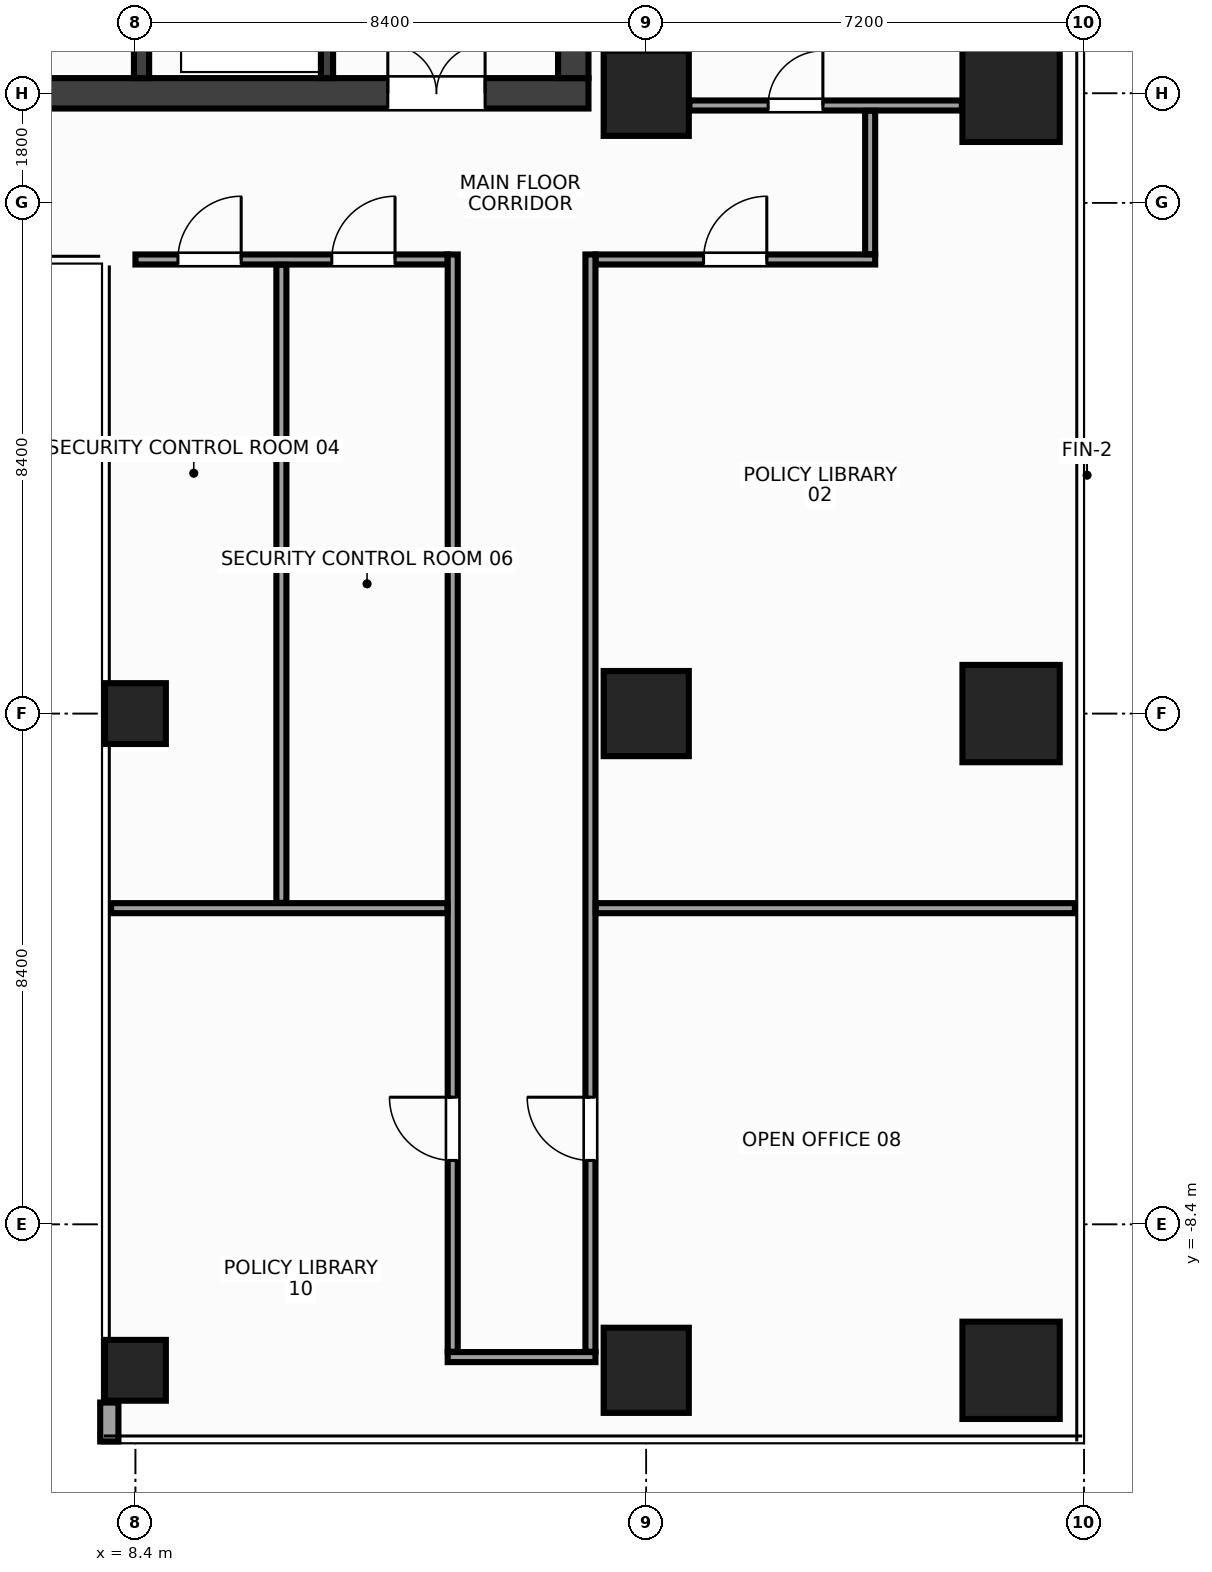
"""IFC4 building model, lengths in metres.
Left out: names, types, materials, properties, quantities, classifications, styles, units other than length and angle.
Written with IfcOpenShell. Run it as: python <this file> out.ifc"""

import sys

from ifc_helpers import new_model, si_unit, direction, frame, frame_2d, origin, origin_2d, place, context, subcontext, project, spatial, rectangle, hollow_rectangle, extrude, source, transform, mapped, element, fill, save


model = new_model("IFC4")
c1 = context("Model", 3, precision=1e-05, world=origin(), true_north=direction((0.0, 1.0)))
c2 = subcontext(c1, "Body", "Model", "MODEL_VIEW")
j1 = project(units=[si_unit("LENGTHUNIT", "METRE"), si_unit("PLANEANGLEUNIT", "RADIAN")], contexts=[c1])
p1 = place(None, origin())
s1 = spatial("IfcSite", under=j1, at=p1, CompositionType="ELEMENT")
p2 = place(p1, origin())
s2 = spatial("IfcBuilding", under=s1, at=p2, CompositionType="ELEMENT")
p3 = place(p2, frame((0.0, 0.0, 218.0)))
s3 = spatial("IfcBuildingStorey", under=s2, at=p3, CompositionType="ELEMENT", Elevation=218.0)
m1 = source(origin(), c2, "Body", "SweptSolid", [
    extrude(rectangle(XDim=31.7, YDim=0.5, at=frame_2d((15.85, 0.0))), origin(), (0.0, 0.0, 1.0), 3.6),
])
p4 = place(p3, frame((-15.85, 10.2, 0.0), z_axis=(0.0, 0.0, 1.0), x_axis=(1.0, 0.0, 0.0)))
e1 = element("IfcWall", 1, at=p4, inside=s3, PredefinedType="SHEAR", context=c2, shape_type="MappedRepresentation", body=[
    mapped(m1, transform((0.0, 0.0, 0.0), x_axis=(1.0, 0.0, 0.0), y_axis=(0.0, 1.0, 0.0), z_axis=(0.0, 0.0, 1.0), scale=1.0)),
])
p5 = place(p4, frame((1.7, 0.0, 0.0)))
e2 = element("IfcOpeningElement", 2, at=p5, cuts=e1, PredefinedType="OPENING", context=c2, shape_type="SweptSolid", body=[
    extrude(rectangle(XDim=1.6, YDim=2.15, at=frame_2d((0.8, 1.075))), frame((0.0, 0.262, 0.0), z_axis=(0.0, -1.0, 0.0), x_axis=(1.0, 0.0, 0.0)), (0.0, 0.0, 1.0), 0.524),
])
p6 = place(p4, frame((28.4, 0.0, 0.0)))
e3 = element("IfcOpeningElement", 3, at=p6, cuts=e1, PredefinedType="OPENING", context=c2, shape_type="SweptSolid", body=[
    extrude(rectangle(XDim=1.6, YDim=2.15, at=frame_2d((0.8, 1.075))), frame((0.0, 0.262, 0.0), z_axis=(0.0, -1.0, 0.0), x_axis=(1.0, 0.0, 0.0)), (0.0, 0.0, 1.0), 0.524),
])
p7 = place(p4, frame((15.1, 0.0, 0.0)))
e4 = element("IfcOpeningElement", 4, at=p7, cuts=e1, PredefinedType="OPENING", context=c2, shape_type="SweptSolid", body=[
    extrude(rectangle(XDim=1.5, YDim=2.2, at=frame_2d((0.75, 1.1))), frame((0.0, 0.262, 0.0), z_axis=(0.0, -1.0, 0.0), x_axis=(1.0, 0.0, 0.0)), (0.0, 0.0, 1.0), 0.524),
])
m2 = source(origin(), c2, "Body", "SweptSolid", [
    extrude(rectangle(XDim=13.1, YDim=0.5, at=frame_2d((6.55, 0.0))), origin(), (0.0, 0.0, 1.0), 3.6),
])
p8 = place(p3, frame((15.6, 10.45, 0.0), z_axis=(0.0, 0.0, 1.0), x_axis=(0.0, 1.0, 0.0)))
e5 = element("IfcWall", 5, at=p8, inside=s3, PredefinedType="SHEAR", context=c2, shape_type="MappedRepresentation", body=[
    mapped(m2, transform((0.0, 0.0, 0.0), x_axis=(1.0, 0.0, 0.0), y_axis=(0.0, 1.0, 0.0), z_axis=(0.0, 0.0, 1.0), scale=1.0)),
])
m3 = source(origin(), c2, "Body", "SweptSolid", [
    extrude(rectangle(XDim=13.1, YDim=0.25, at=frame_2d((6.55, 0.0))), origin(), (0.0, 0.0, 1.0), 3.6),
])
p9 = place(p3, frame((8.5, 10.45, 0.0), z_axis=(0.0, 0.0, 1.0), x_axis=(0.0, 1.0, 0.0)))
e6 = element("IfcWall", 6, at=p9, inside=s3, PredefinedType="SHEAR", context=c2, shape_type="MappedRepresentation", body=[
    mapped(m3, transform((0.0, 0.0, 0.0), x_axis=(1.0, 0.0, 0.0), y_axis=(0.0, 1.0, 0.0), z_axis=(0.0, 0.0, 1.0), scale=1.0)),
])
p10 = place(p9, frame((10.0, 0.0, 0.0)))
e7 = element("IfcOpeningElement", 7, at=p10, cuts=e6, PredefinedType="OPENING", context=c2, shape_type="SweptSolid", body=[
    extrude(rectangle(XDim=0.95, YDim=2.15, at=frame_2d((0.475, 1.075))), frame((0.0, 0.137, 0.0), z_axis=(0.0, -1.0, 0.0), x_axis=(1.0, 0.0, 0.0)), (0.0, 0.0, 1.0), 0.274),
])
m4 = source(origin(), c2, "Body", "SweptSolid", [
    extrude(rectangle(XDim=3.2, YDim=0.2, at=frame_2d((1.6, 0.0))), origin(), (0.0, 0.0, 1.0), 3.6),
])
p11 = place(p3, frame((11.55, 10.45, 0.0), z_axis=(0.0, 0.0, 1.0), x_axis=(0.0, 1.0, 0.0)))
e8 = element("IfcWall", 8, at=p11, inside=s3, PredefinedType="SHEAR", context=c2, shape_type="MappedRepresentation", body=[
    mapped(m4, transform((0.0, 0.0, 0.0), x_axis=(1.0, 0.0, 0.0), y_axis=(0.0, 1.0, 0.0), z_axis=(0.0, 0.0, 1.0), scale=1.0)),
])
p12 = place(p11, frame((0.9, 0.0, 0.0)))
e9 = element("IfcOpeningElement", 9, at=p12, cuts=e8, PredefinedType="OPENING", context=c2, shape_type="SweptSolid", body=[
    extrude(rectangle(XDim=1.1, YDim=2.15, at=frame_2d((0.55, 1.075))), frame((0.0, 0.112, 0.0), z_axis=(0.0, -1.0, 0.0), x_axis=(1.0, 0.0, 0.0)), (0.0, 0.0, 1.0), 0.224),
])
m5 = source(origin(), c2, "Body", "SweptSolid", [
    extrude(rectangle(XDim=1.4, YDim=1.4, at=origin_2d()), origin(), (0.0, 0.0, 1.0), 3.6),
])
for number, where, z_axis, x_axis in (
    (10, (16.8, -10.8, 0.0), (0.0, 0.0, 1.0), (1.0, 0.0, 0.0)),
    (11, (16.8, 0.0, 0.0), (0.0, 0.0, 1.0), (1.0, 0.0, 0.0)),
    (12, (16.8, 10.2, 0.0), (0.0, 0.0, 1.0), (1.0, 0.0, 0.0)),
):
    element("IfcColumn", number, at=place(p3, frame(where, z_axis=z_axis, x_axis=x_axis)), inside=s3, PredefinedType="COLUMN", context=c2, shape_type="MappedRepresentation", body=[
        mapped(m5, transform((0.0, 0.0, 0.0), x_axis=(1.0, 0.0, 0.0), y_axis=(0.0, 1.0, 0.0), z_axis=(0.0, 0.0, 1.0), scale=1.0)),
    ])
m6 = source(origin(), c2, "Body", "SweptSolid", [
    extrude(rectangle(XDim=1.6, YDim=1.6, at=origin_2d()), origin(), (0.0, 0.0, 1.0), 3.6),
])
for number, where, z_axis, x_axis in (
    (13, (22.8, -10.8, 0.0), (0.0, 0.0, 1.0), (1.0, 0.0, 0.0)),
    (14, (22.8, 0.0, 0.0), (0.0, 0.0, 1.0), (1.0, 0.0, 0.0)),
    (15, (22.8, 10.2, 0.0), (0.0, 0.0, 1.0), (1.0, 0.0, 0.0)),
):
    element("IfcColumn", number, at=place(p3, frame(where, z_axis=z_axis, x_axis=x_axis)), inside=s3, PredefinedType="COLUMN", context=c2, shape_type="MappedRepresentation", body=[
        mapped(m6, transform((0.0, 0.0, 0.0), x_axis=(1.0, 0.0, 0.0), y_axis=(0.0, 1.0, 0.0), z_axis=(0.0, 0.0, 1.0), scale=1.0)),
    ])
m7 = source(origin(), c2, "Body", "SweptSolid", [
    extrude(hollow_rectangle(XDim=1.0, YDim=1.0, WallThickness=0.045, at=origin_2d()), origin(), (0.0, 0.0, 1.0), 3.6),
])
for number, where, z_axis, x_axis in (
    (16, (8.4, 0.0, 0.0), (0.0, 0.0, 1.0), (1.0, 0.0, 0.0)),
    (17, (8.4, -10.8, 0.0), (0.0, 0.0, 1.0), (1.0, 0.0, 0.0)),
):
    element("IfcColumn", number, at=place(p3, frame(where, z_axis=z_axis, x_axis=x_axis)), inside=s3, PredefinedType="COLUMN", context=c2, shape_type="MappedRepresentation", body=[
        mapped(m7, transform((0.0, 0.0, 0.0), x_axis=(1.0, 0.0, 0.0), y_axis=(0.0, 1.0, 0.0), z_axis=(0.0, 0.0, 1.0), scale=1.0)),
    ])
m8 = source(origin(), c2, "Body", "SweptSolid", [
    extrude(rectangle(XDim=0.64, YDim=0.24, at=frame_2d((0.32, 0.0))), origin(), (0.0, 0.0, 1.0), 2.76),
])
p13 = place(p3, frame((7.97, -11.33, 0.0), z_axis=(0.0, 0.0, 1.0), x_axis=(0.0, -1.0, 0.0)))
e18 = element("IfcWall", 18, at=p13, inside=s3, PredefinedType="STANDARD", context=c2, shape_type="MappedRepresentation", body=[
    mapped(m8, transform((0.0, 0.0, 0.0), x_axis=(1.0, 0.0, 0.0), y_axis=(0.0, 1.0, 0.0), z_axis=(0.0, 0.0, 1.0), scale=1.0)),
])
m9 = source(origin(), c2, "Body", "SweptSolid", [
    extrude(rectangle(XDim=4.48, YDim=0.165, at=frame_2d((2.24, 0.0))), origin(), (0.0, 0.0, 1.0), 2.915),
])
p14 = place(p3, frame((17.51, 10.0, 0.0), z_axis=(0.0, 0.0, 1.0), x_axis=(1.0, 0.0, 0.0)))
e19 = element("IfcWall", 19, at=p14, inside=s3, PredefinedType="PARTITIONING", context=c2, shape_type="MappedRepresentation", body=[
    mapped(m9, transform((0.0, 0.0, 0.0), x_axis=(1.0, 0.0, 0.0), y_axis=(0.0, 1.0, 0.0), z_axis=(0.0, 0.0, 1.0), scale=1.0)),
])
p15 = place(p14, frame((1.295, 0.0, 0.0)))
e20 = element("IfcOpeningElement", 20, at=p15, cuts=e19, PredefinedType="OPENING", context=c2, shape_type="SweptSolid", body=[
    extrude(rectangle(XDim=0.9, YDim=2.15, at=frame_2d((0.45, 1.075))), frame((0.0, 0.094, 0.0), z_axis=(0.0, -1.0, 0.0), x_axis=(1.0, 0.0, 0.0)), (0.0, 0.0, 1.0), 0.189),
])
m10 = source(origin(), c2, "Body", "SweptSolid", [
    extrude(rectangle(XDim=5.135, YDim=0.165, at=frame_2d((2.567, 0.0))), origin(), (0.0, 0.0, 1.0), 3.38),
])
p16 = place(p3, frame((8.4, 7.468, 0.0), z_axis=(0.0, 0.0, 1.0), x_axis=(1.0, 0.0, 0.0)))
e21 = element("IfcWall", 21, at=p16, inside=s3, PredefinedType="PARTITIONING", context=c2, shape_type="MappedRepresentation", body=[
    mapped(m10, transform((0.0, 0.0, 0.0), x_axis=(1.0, 0.0, 0.0), y_axis=(0.0, 1.0, 0.0), z_axis=(0.0, 0.0, 1.0), scale=1.0)),
])
p17 = place(p16, frame((0.699, 0.0, 0.0)))
e22 = element("IfcOpeningElement", 22, at=p17, cuts=e21, PredefinedType="OPENING", context=c2, shape_type="SweptSolid", body=[
    extrude(rectangle(XDim=1.04, YDim=2.2, at=frame_2d((0.52, 1.1))), frame((0.0, 0.094, 0.0), z_axis=(0.0, -1.0, 0.0), x_axis=(1.0, 0.0, 0.0)), (0.0, 0.0, 1.0), 0.189),
])
p18 = place(p16, frame((3.229, 0.0, 0.0)))
e23 = element("IfcOpeningElement", 23, at=p18, cuts=e21, PredefinedType="OPENING", context=c2, shape_type="SweptSolid", body=[
    extrude(rectangle(XDim=1.04, YDim=2.2, at=frame_2d((0.52, 1.1))), frame((0.0, 0.094, 0.0), z_axis=(0.0, -1.0, 0.0), x_axis=(1.0, 0.0, 0.0)), (0.0, 0.0, 1.0), 0.189),
])
m11 = source(origin(), c2, "Body", "SweptSolid", [
    extrude(rectangle(XDim=4.6, YDim=0.165, at=frame_2d((2.3, 0.0))), origin(), (0.0, 0.0, 1.0), 2.765),
])
p19 = place(p3, frame((15.965, 7.468, 0.0), z_axis=(0.0, 0.0, 1.0), x_axis=(1.0, 0.0, 0.0)))
e24 = element("IfcWall", 24, at=p19, inside=s3, PredefinedType="PARTITIONING", context=c2, shape_type="MappedRepresentation", body=[
    mapped(m11, transform((0.0, 0.0, 0.0), x_axis=(1.0, 0.0, 0.0), y_axis=(0.0, 1.0, 0.0), z_axis=(0.0, 0.0, 1.0), scale=1.0)),
])
p20 = place(p19, frame((1.778, 0.0, 0.0)))
e25 = element("IfcOpeningElement", 25, at=p20, cuts=e24, PredefinedType="OPENING", context=c2, shape_type="SweptSolid", body=[
    extrude(rectangle(XDim=1.04, YDim=2.2, at=frame_2d((0.52, 1.1))), frame((0.0, 0.094, 0.0), z_axis=(0.0, -1.0, 0.0), x_axis=(1.0, 0.0, 0.0)), (0.0, 0.0, 1.0), 0.189),
])
m12 = source(origin(), c2, "Body", "SweptSolid", [
    extrude(rectangle(XDim=2.43, YDim=0.165, at=frame_2d((1.215, 0.0))), origin(), (0.0, 0.0, 1.0), 2.915),
])
p21 = place(p3, frame((13.535, -10.583, 0.0), z_axis=(0.0, 0.0, 1.0), x_axis=(1.0, 0.0, 0.0)))
e26 = element("IfcWall", 26, at=p21, inside=s3, PredefinedType="PARTITIONING", context=c2, shape_type="MappedRepresentation", body=[
    mapped(m12, transform((0.0, 0.0, 0.0), x_axis=(1.0, 0.0, 0.0), y_axis=(0.0, 1.0, 0.0), z_axis=(0.0, 0.0, 1.0), scale=1.0)),
])
m13 = source(origin(), c2, "Body", "SweptSolid", [
    extrude(rectangle(XDim=2.358, YDim=0.165, at=frame_2d((1.179, 0.0))), origin(), (0.0, 0.0, 1.0), 3.38),
])
p22 = place(p3, frame((20.482, 7.555, 0.0), z_axis=(0.0, 0.0, 1.0), x_axis=(0.0, 1.0, 0.0)))
e27 = element("IfcWall", 27, at=p22, inside=s3, PredefinedType="PARTITIONING", context=c2, shape_type="MappedRepresentation", body=[
    mapped(m13, transform((0.0, 0.0, 0.0), x_axis=(1.0, 0.0, 0.0), y_axis=(0.0, 1.0, 0.0), z_axis=(0.0, 0.0, 1.0), scale=1.0)),
])
m14 = source(origin(), c2, "Body", "SweptSolid", [
    extrude(rectangle(XDim=18.045, YDim=0.165, at=frame_2d((9.022, 0.0))), origin(), (0.0, 0.0, 1.0), 2.915),
])
p23 = place(p3, frame((13.617, -10.495, 0.0), z_axis=(0.0, 0.0, 1.0), x_axis=(0.0, 1.0, 0.0)))
e28 = element("IfcWall", 28, at=p23, inside=s3, PredefinedType="PARTITIONING", context=c2, shape_type="MappedRepresentation", body=[
    mapped(m14, transform((0.0, 0.0, 0.0), x_axis=(1.0, 0.0, 0.0), y_axis=(0.0, 1.0, 0.0), z_axis=(0.0, 0.0, 1.0), scale=1.0)),
])
p24 = place(p23, frame((3.146, 0.0, 0.0)))
e29 = element("IfcOpeningElement", 29, at=p24, cuts=e28, PredefinedType="OPENING", context=c2, shape_type="SweptSolid", body=[
    extrude(rectangle(XDim=1.04, YDim=2.2, at=frame_2d((0.52, 1.1))), frame((0.0, 0.094, 0.0), z_axis=(0.0, -1.0, 0.0), x_axis=(1.0, 0.0, 0.0)), (0.0, 0.0, 1.0), 0.189),
])
p25 = place(p3, frame((15.883, -10.495, 0.0), z_axis=(0.0, 0.0, 1.0), x_axis=(0.0, 1.0, 0.0)))
e30 = element("IfcWall", 30, at=p25, inside=s3, PredefinedType="PARTITIONING", context=c2, shape_type="MappedRepresentation", body=[
    mapped(m14, transform((0.0, 0.0, 0.0), x_axis=(1.0, 0.0, 0.0), y_axis=(0.0, 1.0, 0.0), z_axis=(0.0, 0.0, 1.0), scale=1.0)),
])
p26 = place(p25, frame((3.146, 0.0, 0.0)))
e31 = element("IfcOpeningElement", 31, at=p26, cuts=e30, PredefinedType="OPENING", context=c2, shape_type="SweptSolid", body=[
    extrude(rectangle(XDim=1.04, YDim=2.2, at=frame_2d((0.52, 1.1))), frame((0.0, 0.094, 0.0), z_axis=(0.0, -1.0, 0.0), x_axis=(1.0, 0.0, 0.0)), (0.0, 0.0, 1.0), 0.189),
])
m15 = source(origin(), c2, "Body", "SweptSolid", [
    extrude(rectangle(XDim=5.53, YDim=0.165, at=frame_2d((2.765, 0.0))), origin(), (0.0, 0.0, 1.0), 2.765),
])
p27 = place(p3, frame((8.0, -3.2, 0.0), z_axis=(0.0, 0.0, 1.0), x_axis=(1.0, 0.0, 0.0)))
e32 = element("IfcWall", 32, at=p27, inside=s3, PredefinedType="PARTITIONING", context=c2, shape_type="MappedRepresentation", body=[
    mapped(m15, transform((0.0, 0.0, 0.0), x_axis=(1.0, 0.0, 0.0), y_axis=(0.0, 1.0, 0.0), z_axis=(0.0, 0.0, 1.0), scale=1.0)),
])
m16 = source(origin(), c2, "Body", "SweptSolid", [
    extrude(rectangle(XDim=7.88, YDim=0.165, at=frame_2d((3.94, 0.0))), origin(), (0.0, 0.0, 1.0), 2.765),
])
p28 = place(p3, frame((15.97, -3.2, 0.0), z_axis=(0.0, 0.0, 1.0), x_axis=(1.0, 0.0, 0.0)))
e33 = element("IfcWall", 33, at=p28, inside=s3, PredefinedType="PARTITIONING", context=c2, shape_type="MappedRepresentation", body=[
    mapped(m16, transform((0.0, 0.0, 0.0), x_axis=(1.0, 0.0, 0.0), y_axis=(0.0, 1.0, 0.0), z_axis=(0.0, 0.0, 1.0), scale=1.0)),
])
m17 = source(origin(), c2, "Body", "SweptSolid", [
    extrude(rectangle(XDim=10.492, YDim=0.165, at=frame_2d((5.246, 0.0))), origin(), (0.0, 0.0, 1.0), 2.915),
])
p29 = place(p3, frame((10.8, -3.113, 0.0), z_axis=(0.0, 0.0, 1.0), x_axis=(0.0, 1.0, 0.0)))
e34 = element("IfcWall", 34, at=p29, inside=s3, PredefinedType="PARTITIONING", context=c2, shape_type="MappedRepresentation", body=[
    mapped(m17, transform((0.0, 0.0, 0.0), x_axis=(1.0, 0.0, 0.0), y_axis=(0.0, 1.0, 0.0), z_axis=(0.0, 0.0, 1.0), scale=1.0)),
])
m18 = source(origin(), c2, "Body", "SweptSolid", [
    extrude(rectangle(XDim=1.6, YDim=2.15, at=frame_2d((0.8, 1.075))), frame((0.0, 0.025, 0.0), z_axis=(0.0, -1.0, 0.0), x_axis=(1.0, 0.0, 0.0)), (0.0, 0.0, 1.0), 0.05),
])
p30 = place(p6, origin())
e35 = element("IfcDoor", 35, at=p30, inside=s3, OperationType="DOUBLE_DOOR_SINGLE_SWING", PredefinedType="DOOR", context=c2, shape_type="MappedRepresentation", body=[
    mapped(m18, transform((0.0, 0.0, 0.0), x_axis=(1.0, 0.0, 0.0), y_axis=(0.0, 1.0, 0.0), z_axis=(0.0, 0.0, 1.0), scale=1.0)),
])
fill(e3, e35)
m19 = source(origin(), c2, "Body", "SweptSolid", [
    extrude(rectangle(XDim=0.9, YDim=2.15, at=frame_2d((0.45, 1.075))), frame((0.0, 0.025, 0.0), z_axis=(0.0, -1.0, 0.0), x_axis=(1.0, 0.0, 0.0)), (0.0, 0.0, 1.0), 0.05),
])
p31 = place(p15, origin())
e36 = element("IfcDoor", 36, at=p31, inside=s3, OperationType="SINGLE_SWING_RIGHT", PredefinedType="DOOR", context=c2, shape_type="MappedRepresentation", body=[
    mapped(m19, transform((0.0, 0.0, 0.0), x_axis=(1.0, 0.0, 0.0), y_axis=(0.0, 1.0, 0.0), z_axis=(0.0, 0.0, 1.0), scale=1.0)),
])
fill(e20, e36)
m20 = source(origin(), c2, "Body", "SweptSolid", [
    extrude(rectangle(XDim=1.04, YDim=2.2, at=frame_2d((0.52, 1.1))), frame((0.0, 0.025, 0.0), z_axis=(0.0, -1.0, 0.0), x_axis=(1.0, 0.0, 0.0)), (0.0, 0.0, 1.0), 0.05),
])
p32 = place(p20, origin())
e37 = element("IfcDoor", 37, at=p32, inside=s3, OperationType="SINGLE_SWING_RIGHT", PredefinedType="DOOR", context=c2, shape_type="MappedRepresentation", body=[
    mapped(m20, transform((0.0, 0.0, 0.0), x_axis=(1.0, 0.0, 0.0), y_axis=(0.0, 1.0, 0.0), z_axis=(0.0, 0.0, 1.0), scale=1.0)),
])
fill(e25, e37)
p33 = place(p17, origin())
e38 = element("IfcDoor", 38, at=p33, inside=s3, OperationType="SINGLE_SWING_RIGHT", PredefinedType="DOOR", context=c2, shape_type="MappedRepresentation", body=[
    mapped(m20, transform((0.0, 0.0, 0.0), x_axis=(1.0, 0.0, 0.0), y_axis=(0.0, 1.0, 0.0), z_axis=(0.0, 0.0, 1.0), scale=1.0)),
])
fill(e22, e38)
p34 = place(p18, origin())
e39 = element("IfcDoor", 39, at=p34, inside=s3, OperationType="SINGLE_SWING_RIGHT", PredefinedType="DOOR", context=c2, shape_type="MappedRepresentation", body=[
    mapped(m20, transform((0.0, 0.0, 0.0), x_axis=(1.0, 0.0, 0.0), y_axis=(0.0, 1.0, 0.0), z_axis=(0.0, 0.0, 1.0), scale=1.0)),
])
fill(e23, e39)
p35 = place(p26, origin())
e40 = element("IfcDoor", 40, at=p35, inside=s3, OperationType="SINGLE_SWING_RIGHT", PredefinedType="DOOR", context=c2, shape_type="MappedRepresentation", body=[
    mapped(m20, transform((0.0, 0.0, 0.0), x_axis=(1.0, 0.0, 0.0), y_axis=(0.0, 1.0, 0.0), z_axis=(0.0, 0.0, 1.0), scale=1.0)),
])
fill(e31, e40)
p36 = place(p24, origin())
e41 = element("IfcDoor", 41, at=p36, inside=s3, OperationType="SINGLE_SWING_RIGHT", PredefinedType="DOOR", context=c2, shape_type="MappedRepresentation", body=[
    mapped(m20, transform((0.0, 0.0, 0.0), x_axis=(1.0, 0.0, 0.0), y_axis=(0.0, 1.0, 0.0), z_axis=(0.0, 0.0, 1.0), scale=1.0)),
])
fill(e29, e41)
save(model, sys.argv[1])
